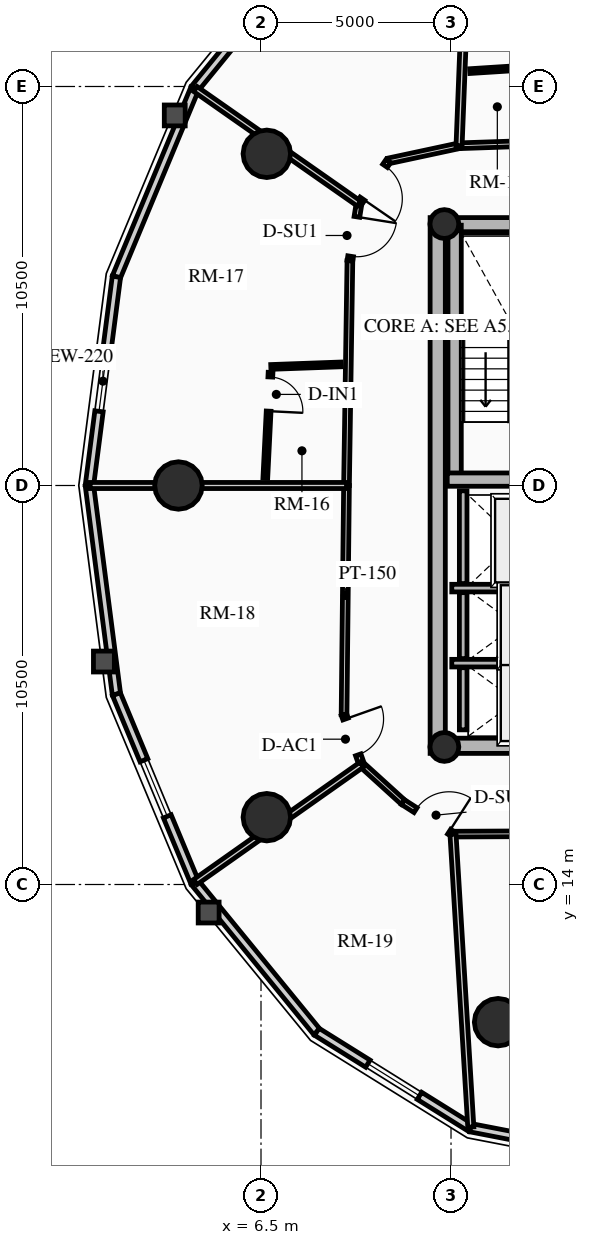
"""IFC4 building model, lengths in metres.
Left out: names, types, materials, properties, quantities, classifications, styles, units other than length and angle.
Written with IfcOpenShell. Run it as: python <this file> out.ifc"""

import sys

from ifc_helpers import new_model, si_unit, direction, frame, frame_2d, origin, origin_2d, place, context, subcontext, project, spatial, rectangle, circle, hollow_circle, extrude, source, transform, mapped, element, fill, save


model = new_model("IFC4")
c1 = context("Model", 3, precision=1e-05, world=origin(), true_north=direction((0.0, 1.0)))
c2 = subcontext(c1, "Body", "Model", "MODEL_VIEW")
j1 = project(units=[si_unit("LENGTHUNIT", "METRE"), si_unit("PLANEANGLEUNIT", "RADIAN")], contexts=[c1])
p1 = place(None, origin())
s1 = spatial("IfcSite", under=j1, at=p1, CompositionType="ELEMENT")
p2 = place(p1, origin())
s2 = spatial("IfcBuilding", under=s1, at=p2, CompositionType="ELEMENT")
p3 = place(p2, frame((0.0, 0.0, 157.42)))
s3 = spatial("IfcBuildingStorey", under=s2, at=p3, CompositionType="ELEMENT", Elevation=157.42)
p4 = place(p3, frame((11.15, 17.45, 0.0), z_axis=(0.0, 0.0, 1.0), x_axis=(0.0, 1.0, 0.0)))
e1 = element("IfcWall", 1, at=p4, inside=s3, PredefinedType="SHEAR", context=c2, shape_type="SweptSolid", body=[
    extrude(rectangle(XDim=14.1, YDim=0.4, at=frame_2d((7.05, 0.0))), origin(), (0.0, 0.0, 1.0), 2.91),
])
p5 = place(p3, frame((11.15, 17.65, 0.0), z_axis=(0.0, 0.0, 1.0), x_axis=(1.0, 0.0, 0.0)))
e2 = element("IfcWall", 2, at=p5, inside=s3, PredefinedType="SHEAR", context=c2, shape_type="SweptSolid", body=[
    extrude(rectangle(XDim=10.7, YDim=0.4, at=frame_2d((5.35, 0.0))), origin(), (0.0, 0.0, 1.0), 2.91),
])
m1 = source(origin(), c2, "Body", "SweptSolid", [
    extrude(rectangle(XDim=1.5, YDim=2.02, at=frame_2d((0.75, 1.01))), frame((0.0, 0.21, 0.0), z_axis=(0.0, -1.0, 0.0), x_axis=(1.0, 0.0, 0.0)), (0.0, 0.0, 1.0), 0.42),
])
p6 = place(p5, frame((5.45, 0.0, 0.0)))
e3 = element("IfcOpeningElement", 3, at=p6, cuts=e2, PredefinedType="OPENING", context=c2, shape_type="MappedRepresentation", body=[
    mapped(m1, transform((0.0, 0.0, 0.0), x_axis=(1.0, 0.0, 0.0), y_axis=(0.0, 1.0, 0.0), z_axis=(0.0, 0.0, 1.0), scale=1.0)),
])
p7 = place(p3, frame((11.15, 31.35, 0.0), z_axis=(0.0, 0.0, 1.0), x_axis=(1.0, 0.0, 0.0)))
e4 = element("IfcWall", 4, at=p7, inside=s3, PredefinedType="SHEAR", context=c2, shape_type="SweptSolid", body=[
    extrude(rectangle(XDim=10.7, YDim=0.4, at=frame_2d((5.35, 0.0))), origin(), (0.0, 0.0, 1.0), 2.91),
])
p8 = place(p7, frame((4.6, 0.0, 0.0)))
e5 = element("IfcOpeningElement", 5, at=p8, cuts=e4, PredefinedType="OPENING", context=c2, shape_type="MappedRepresentation", body=[
    mapped(m1, transform((0.0, 0.0, 0.0), x_axis=(1.0, 0.0, 0.0), y_axis=(0.0, 1.0, 0.0), z_axis=(0.0, 0.0, 1.0), scale=1.0)),
])
p9 = place(p3, frame((11.595, 24.655, 0.0), z_axis=(0.0, 0.0, 1.0), x_axis=(0.0, 1.0, 0.0)))
e6 = element("IfcWall", 6, at=p9, inside=s3, PredefinedType="SHEAR", context=c2, shape_type="SweptSolid", body=[
    extrude(rectangle(XDim=6.695, YDim=0.35, at=frame_2d((3.348, 0.0))), origin(), (0.0, 0.0, 1.0), 2.91),
])
p10 = place(p3, frame((11.4, 24.655, 0.0), z_axis=(0.0, 0.0, 1.0), x_axis=(1.0, 0.0, 0.0)))
e7 = element("IfcWall", 7, at=p10, inside=s3, PredefinedType="SHEAR", context=c2, shape_type="SweptSolid", body=[
    extrude(rectangle(XDim=3.285, YDim=0.35, at=frame_2d((1.643, 0.0))), origin(), (0.0, 0.0, 1.0), 2.91),
])
for number, where, z_axis, x_axis in (
    (8, (11.325, 17.62, 0.0), (0.0, 0.0, 1.0), (1.0, 0.0, 0.0)),
    (9, (11.325, 31.38, 0.0), (0.0, 0.0, 1.0), (1.0, 0.0, 0.0)),
):
    element("IfcColumn", number, at=place(p3, frame(where, z_axis=z_axis, x_axis=x_axis)), inside=s3, PredefinedType="COLUMN", context=c2, shape_type="SweptSolid", body=[
        extrude(hollow_circle(Radius=0.38, WallThickness=0.032, at=origin_2d()), origin(), (0.0, 0.0, 1.0), 2.91),
    ])
for number, where, z_axis, x_axis in (
    (10, (6.653, 33.229, 0.0), (0.0, 0.0, 1.0), (1.0, 0.0, 0.0)),
    (11, (4.328, 24.5, 0.0), (0.0, 0.0, 1.0), (1.0, 0.0, 0.0)),
    (12, (6.653, 15.771, 0.0), (0.0, 0.0, 1.0), (1.0, 0.0, 0.0)),
    (13, (12.739, 10.377, 0.0), (0.0, 0.0, 1.0), (1.0, 0.0, 0.0)),
):
    element("IfcColumn", number, at=place(p3, frame(where, z_axis=z_axis, x_axis=x_axis)), inside=s3, PredefinedType="USERDEFINED", context=c2, shape_type="SweptSolid", body=[
        extrude(circle(Radius=0.625, at=origin_2d()), origin(), (0.0, 0.0, 1.0), 2.91),
    ])
p11 = place(p3, frame((4.757, 34.945, 0.0), z_axis=(0.0, 0.0, 1.0), x_axis=(0.632598524901, 0.774479894053, 0.0)))
e14 = element("IfcWall", 14, at=p11, inside=s3, PredefinedType="SOLIDWALL", context=c2, shape_type="SweptSolid", body=[
    extrude(rectangle(XDim=5.076, YDim=0.22, at=frame_2d((2.538, 0.0))), origin(), (0.0, 0.0, 1.0), 2.245),
])
m2 = source(origin(), c2, "Body", "SweptSolid", [
    extrude(rectangle(XDim=1.6, YDim=1.3, at=frame_2d((0.8, 0.65))), frame((0.0, 0.12, 0.0), z_axis=(0.0, -1.0, 0.0), x_axis=(1.0, 0.0, 0.0)), (0.0, 0.0, 1.0), 0.24),
])
p12 = place(p11, frame((1.738, 0.0, 0.65)))
e15 = element("IfcOpeningElement", 15, at=p12, cuts=e14, PredefinedType="OPENING", context=c2, shape_type="MappedRepresentation", body=[
    mapped(m2, transform((0.0, 0.0, 0.0), x_axis=(1.0, 0.0, 0.0), y_axis=(0.0, 1.0, 0.0), z_axis=(0.0, 0.0, 1.0), scale=1.0)),
])
p13 = place(p3, frame((2.695, 29.991, 0.0), z_axis=(0.0, 0.0, 1.0), x_axis=(0.384259959969, 0.923224936386, 0.0)))
e16 = element("IfcWall", 16, at=p13, inside=s3, PredefinedType="SOLIDWALL", context=c2, shape_type="SweptSolid", body=[
    extrude(rectangle(XDim=5.365, YDim=0.22, at=frame_2d((2.683, 0.0))), origin(), (0.0, 0.0, 1.0), 2.245),
])
p14 = place(p3, frame((1.985, 24.5, 0.0), z_axis=(0.0, 0.0, 1.0), x_axis=(0.128266533912, 0.991739732126, 0.0)))
e17 = element("IfcWall", 17, at=p14, inside=s3, PredefinedType="SOLIDWALL", context=c2, shape_type="SweptSolid", body=[
    extrude(rectangle(XDim=5.537, YDim=0.22, at=frame_2d((2.769, 0.0))), origin(), (0.0, 0.0, 1.0), 2.245),
])
p15 = place(p14, frame((1.968, 0.0, 0.65)))
e18 = element("IfcOpeningElement", 18, at=p15, cuts=e17, PredefinedType="OPENING", context=c2, shape_type="MappedRepresentation", body=[
    mapped(m2, transform((0.0, 0.0, 0.0), x_axis=(1.0, 0.0, 0.0), y_axis=(0.0, 1.0, 0.0), z_axis=(0.0, 0.0, 1.0), scale=1.0)),
])
p16 = place(p3, frame((2.695, 19.009, 0.0), z_axis=(0.0, 0.0, 1.0), x_axis=(-0.128266533912, 0.991739732126, 0.0)))
e19 = element("IfcWall", 19, at=p16, inside=s3, PredefinedType="SOLIDWALL", context=c2, shape_type="SweptSolid", body=[
    extrude(rectangle(XDim=5.537, YDim=0.22, at=frame_2d((2.769, 0.0))), origin(), (0.0, 0.0, 1.0), 2.245),
])
p17 = place(p3, frame((4.757, 14.055, 0.0), z_axis=(0.0, 0.0, 1.0), x_axis=(-0.384259959969, 0.923224936386, 0.0)))
e20 = element("IfcWall", 20, at=p17, inside=s3, PredefinedType="SOLIDWALL", context=c2, shape_type="SweptSolid", body=[
    extrude(rectangle(XDim=5.365, YDim=0.22, at=frame_2d((2.683, 0.0))), origin(), (0.0, 0.0, 1.0), 2.245),
])
p18 = place(p17, frame((1.883, 0.0, 0.65)))
e21 = element("IfcOpeningElement", 21, at=p18, cuts=e20, PredefinedType="OPENING", context=c2, shape_type="MappedRepresentation", body=[
    mapped(m2, transform((0.0, 0.0, 0.0), x_axis=(1.0, 0.0, 0.0), y_axis=(0.0, 1.0, 0.0), z_axis=(0.0, 0.0, 1.0), scale=1.0)),
])
p19 = place(p3, frame((7.968, 10.124, 0.0), z_axis=(0.0, 0.0, 1.0), x_axis=(-0.632598524901, 0.774479894053, 0.0)))
e22 = element("IfcWall", 22, at=p19, inside=s3, PredefinedType="SOLIDWALL", context=c2, shape_type="SweptSolid", body=[
    extrude(rectangle(XDim=5.076, YDim=0.22, at=frame_2d((2.538, 0.0))), origin(), (0.0, 0.0, 1.0), 2.245),
])
p20 = place(p3, frame((12.015, 7.6, 0.0), z_axis=(0.0, 0.0, 1.0), x_axis=(-0.848452391194, 0.529271707044, 0.0)))
e23 = element("IfcWall", 23, at=p20, inside=s3, PredefinedType="SOLIDWALL", context=c2, shape_type="SweptSolid", body=[
    extrude(rectangle(XDim=4.769, YDim=0.22, at=frame_2d((2.385, 0.0))), origin(), (0.0, 0.0, 1.0), 2.245),
])
p21 = place(p20, frame((1.585, 0.0, 0.65)))
e24 = element("IfcOpeningElement", 24, at=p21, cuts=e23, PredefinedType="OPENING", context=c2, shape_type="MappedRepresentation", body=[
    mapped(m2, transform((0.0, 0.0, 0.0), x_axis=(1.0, 0.0, 0.0), y_axis=(0.0, 1.0, 0.0), z_axis=(0.0, 0.0, 1.0), scale=1.0)),
])
p22 = place(p3, frame((16.5, 6.73, 0.0), z_axis=(0.0, 0.0, 1.0), x_axis=(-0.981718699963, 0.190337579429, 0.0)))
e25 = element("IfcWall", 25, at=p22, inside=s3, PredefinedType="SOLIDWALL", context=c2, shape_type="SweptSolid", body=[
    extrude(rectangle(XDim=4.569, YDim=0.22, at=frame_2d((2.284, 0.0))), origin(), (0.0, 0.0, 1.0), 2.245),
])
p23 = place(p22, frame((1.484, 0.0, 0.65)))
e26 = element("IfcOpeningElement", 26, at=p23, cuts=e25, PredefinedType="OPENING", context=c2, shape_type="MappedRepresentation", body=[
    mapped(m2, transform((0.0, 0.0, 0.0), x_axis=(1.0, 0.0, 0.0), y_axis=(0.0, 1.0, 0.0), z_axis=(0.0, 0.0, 1.0), scale=1.0)),
])
p24 = place(p3, frame((11.52, 21.8, 0.0), z_axis=(0.0, 0.0, 1.0), x_axis=(1.0, 0.0, 0.0)))
e27 = element("IfcWall", 27, at=p24, inside=s3, PredefinedType="SHEAR", context=c2, shape_type="SweptSolid", body=[
    extrude(rectangle(XDim=2.97, YDim=0.2, at=frame_2d((1.485, 0.0))), origin(), (0.0, 0.0, 1.0), 2.91),
])
p25 = place(p3, frame((11.82, 21.92, 0.0), z_axis=(0.0, 0.0, 1.0), x_axis=(0.0, 1.0, 0.0)))
e28 = element("IfcWall", 28, at=p25, inside=s3, PredefinedType="SHEAR", context=c2, shape_type="SweptSolid", body=[
    extrude(rectangle(XDim=2.44, YDim=0.2, at=frame_2d((1.22, 0.0))), origin(), (0.0, 0.0, 1.0), 2.91),
])
p26 = place(p3, frame((11.52, 19.825, 0.0), z_axis=(0.0, 0.0, 1.0), x_axis=(1.0, 0.0, 0.0)))
e29 = element("IfcWall", 29, at=p26, inside=s3, PredefinedType="SHEAR", context=c2, shape_type="SweptSolid", body=[
    extrude(rectangle(XDim=2.97, YDim=0.2, at=frame_2d((1.485, 0.0))), origin(), (0.0, 0.0, 1.0), 2.91),
])
p27 = place(p3, frame((11.82, 19.945, 0.0), z_axis=(0.0, 0.0, 1.0), x_axis=(0.0, 1.0, 0.0)))
e30 = element("IfcWall", 30, at=p27, inside=s3, PredefinedType="SHEAR", context=c2, shape_type="SweptSolid", body=[
    extrude(rectangle(XDim=1.735, YDim=0.2, at=frame_2d((0.867, 0.0))), origin(), (0.0, 0.0, 1.0), 2.91),
])
p28 = place(p3, frame((11.82, 18.07, 0.0), z_axis=(0.0, 0.0, 1.0), x_axis=(0.0, 1.0, 0.0)))
e31 = element("IfcWall", 31, at=p28, inside=s3, PredefinedType="SHEAR", context=c2, shape_type="SweptSolid", body=[
    extrude(rectangle(XDim=1.635, YDim=0.2, at=frame_2d((0.817, 0.0))), origin(), (0.0, 0.0, 1.0), 2.91),
])
p29 = place(p3, frame((18.112, 33.659, 0.0), z_axis=(0.0, 0.0, 1.0), x_axis=(-0.999413895918, -0.034232508622, 0.0)))
e32 = element("IfcWall", 32, at=p29, inside=s3, PredefinedType="PARTITIONING", context=c2, shape_type="SweptSolid", body=[
    extrude(rectangle(XDim=6.404, YDim=0.15, at=frame_2d((3.202, 0.0))), origin(), (0.0, 0.0, 1.0), 2.245),
])
p30 = place(p3, frame((11.712, 33.44, 0.0), z_axis=(0.0, 0.0, 1.0), x_axis=(-0.977753514213, -0.209757158265, 0.0)))
e33 = element("IfcWall", 33, at=p30, inside=s3, PredefinedType="PARTITIONING", context=c2, shape_type="SweptSolid", body=[
    extrude(rectangle(XDim=1.901, YDim=0.15, at=frame_2d((0.95, 0.0))), origin(), (0.0, 0.0, 1.0), 2.245),
])
p31 = place(p3, frame((9.853, 33.042, 0.0), z_axis=(0.0, 0.0, 1.0), x_axis=(-0.567189283521, -0.823587467522, 0.0)))
e34 = element("IfcWall", 34, at=p31, inside=s3, PredefinedType="PARTITIONING", context=c2, shape_type="SweptSolid", body=[
    extrude(rectangle(XDim=1.365, YDim=0.15, at=frame_2d((0.682, 0.0))), origin(), (0.0, 0.0, 1.0), 2.245),
])
m3 = source(origin(), c2, "Body", "SweptSolid", [
    extrude(rectangle(XDim=1.05, YDim=2.015, at=frame_2d((0.525, 1.007))), frame((0.0, 0.085, 0.0), z_axis=(0.0, -1.0, 0.0), x_axis=(1.0, 0.0, 0.0)), (0.0, 0.0, 1.0), 0.17),
])
p32 = place(p31, frame((0.157, 0.0, 0.0)))
e35 = element("IfcOpeningElement", 35, at=p32, cuts=e34, PredefinedType="OPENING", context=c2, shape_type="MappedRepresentation", body=[
    mapped(m3, transform((0.0, 0.0, 0.0), x_axis=(1.0, 0.0, 0.0), y_axis=(0.0, 1.0, 0.0), z_axis=(0.0, 0.0, 1.0), scale=1.0)),
])
p33 = place(p3, frame((9.079, 31.918, 0.0), z_axis=(0.0, 0.0, 1.0), x_axis=(-0.15742775293, -0.987530507178, 0.0)))
e36 = element("IfcWall", 36, at=p33, inside=s3, PredefinedType="PARTITIONING", context=c2, shape_type="SweptSolid", body=[
    extrude(rectangle(XDim=1.523, YDim=0.15, at=frame_2d((0.761, 0.0))), origin(), (0.0, 0.0, 1.0), 2.245),
])
p34 = place(p33, frame((0.353, 0.0, 0.0)))
e37 = element("IfcOpeningElement", 37, at=p34, cuts=e36, PredefinedType="OPENING", context=c2, shape_type="MappedRepresentation", body=[
    mapped(m3, transform((0.0, 0.0, 0.0), x_axis=(1.0, 0.0, 0.0), y_axis=(0.0, 1.0, 0.0), z_axis=(0.0, 0.0, 1.0), scale=1.0)),
])
p35 = place(p3, frame((8.84, 30.414, 0.0), z_axis=(0.0, 0.0, 1.0), x_axis=(-0.01514915101, -0.999885245027, 0.0)))
e38 = element("IfcWall", 38, at=p35, inside=s3, PredefinedType="PARTITIONING", context=c2, shape_type="SweptSolid", body=[
    extrude(rectangle(XDim=5.915, YDim=0.15, at=frame_2d((2.957, 0.0))), origin(), (0.0, 0.0, 1.0), 2.675),
])
p36 = place(p3, frame((8.75, 24.5, 0.0), z_axis=(0.0, 0.0, 1.0), x_axis=(-0.01076642715, -0.999942040344, 0.0)))
e39 = element("IfcWall", 39, at=p36, inside=s3, PredefinedType="PARTITIONING", context=c2, shape_type="SweptSolid", body=[
    extrude(rectangle(XDim=6.032, YDim=0.15, at=frame_2d((3.016, 0.0))), origin(), (0.0, 0.0, 1.0), 2.245),
])
p37 = place(p3, frame((8.685, 18.469, 0.0), z_axis=(0.0, 0.0, 1.0), x_axis=(0.333415749461, -0.942779899028, 0.0)))
e40 = element("IfcWall", 40, at=p37, inside=s3, PredefinedType="PARTITIONING", context=c2, shape_type="SweptSolid", body=[
    extrude(rectangle(XDim=1.394, YDim=0.15, at=frame_2d((0.697, 0.0))), origin(), (0.0, 0.0, 1.0), 2.245),
])
m4 = source(origin(), c2, "Body", "SweptSolid", [
    extrude(rectangle(XDim=1.0, YDim=2.015, at=frame_2d((0.5, 1.007))), frame((0.0, 0.085, 0.0), z_axis=(0.0, -1.0, 0.0), x_axis=(1.0, 0.0, 0.0)), (0.0, 0.0, 1.0), 0.17),
])
p38 = place(p37, frame((0.12, 0.0, 0.0)))
e41 = element("IfcOpeningElement", 41, at=p38, cuts=e40, PredefinedType="OPENING", context=c2, shape_type="MappedRepresentation", body=[
    mapped(m4, transform((0.0, 0.0, 0.0), x_axis=(1.0, 0.0, 0.0), y_axis=(0.0, 1.0, 0.0), z_axis=(0.0, 0.0, 1.0), scale=1.0)),
])
p39 = place(p3, frame((9.15, 17.155, 0.0), z_axis=(0.0, 0.0, 1.0), x_axis=(0.740451494731, -0.672109800517, 0.0)))
e42 = element("IfcWall", 42, at=p39, inside=s3, PredefinedType="PARTITIONING", context=c2, shape_type="SweptSolid", body=[
    extrude(rectangle(XDim=1.468, YDim=0.15, at=frame_2d((0.734, 0.0))), origin(), (0.0, 0.0, 1.0), 2.245),
])
p40 = place(p3, frame((10.237, 16.168, 0.0), z_axis=(0.0, 0.0, 1.0), x_axis=(0.842061223587, -0.53938195718, 0.0)))
e43 = element("IfcWall", 43, at=p40, inside=s3, PredefinedType="PARTITIONING", context=c2, shape_type="SweptSolid", body=[
    extrude(rectangle(XDim=1.562, YDim=0.15, at=frame_2d((0.781, 0.0))), origin(), (0.0, 0.0, 1.0), 2.245),
])
p41 = place(p40, frame((0.392, 0.0, 0.0)))
e44 = element("IfcOpeningElement", 44, at=p41, cuts=e43, PredefinedType="OPENING", context=c2, shape_type="MappedRepresentation", body=[
    mapped(m3, transform((0.0, 0.0, 0.0), x_axis=(1.0, 0.0, 0.0), y_axis=(0.0, 1.0, 0.0), z_axis=(0.0, 0.0, 1.0), scale=1.0)),
])
p42 = place(p3, frame((11.552, 15.326, 0.0), z_axis=(0.0, 0.0, 1.0), x_axis=(0.999989573465, 0.004566504266, 0.0)))
e45 = element("IfcWall", 45, at=p42, inside=s3, PredefinedType="PARTITIONING", context=c2, shape_type="SweptSolid", body=[
    extrude(rectangle(XDim=3.261, YDim=0.15, at=frame_2d((1.631, 0.0))), origin(), (0.0, 0.0, 1.0), 2.245),
])
p43 = place(p3, frame((11.712, 33.44, 0.0), z_axis=(0.0, 0.0, 1.0), x_axis=(0.038892064024, 0.999243417469, 0.0)))
e46 = element("IfcWall", 46, at=p43, inside=s3, PredefinedType="PARTITIONING", context=c2, shape_type="SweptSolid", body=[
    extrude(rectangle(XDim=7.947, YDim=0.16, at=frame_2d((3.974, 0.0))), origin(), (0.0, 0.0, 1.0), 2.245),
])
p44 = place(p3, frame((9.079, 31.918, 0.0), z_axis=(0.0, 0.0, 1.0), x_axis=(-0.819135909075, 0.573599479135, 0.0)))
e47 = element("IfcWall", 47, at=p44, inside=s3, PredefinedType="PARTITIONING", context=c2, shape_type="SweptSolid", body=[
    extrude(rectangle(XDim=5.257, YDim=0.16, at=frame_2d((2.628, 0.0))), origin(), (0.0, 0.0, 1.0), 2.245),
])
p45 = place(p3, frame((8.75, 24.5, 0.0), z_axis=(0.0, 0.0, 1.0), x_axis=(-1.0, 0.0, 0.0)))
e48 = element("IfcWall", 48, at=p45, inside=s3, PredefinedType="PARTITIONING", context=c2, shape_type="SweptSolid", body=[
    extrude(rectangle(XDim=6.745, YDim=0.16, at=frame_2d((3.373, 0.0))), origin(), (0.0, 0.0, 1.0), 2.245),
])
p46 = place(p3, frame((9.15, 17.155, 0.0), z_axis=(0.0, 0.0, 1.0), x_axis=(-0.81708911443, -0.576511386774, 0.0)))
e49 = element("IfcWall", 49, at=p46, inside=s3, PredefinedType="PARTITIONING", context=c2, shape_type="SweptSolid", body=[
    extrude(rectangle(XDim=5.356, YDim=0.16, at=frame_2d((2.678, 0.0))), origin(), (0.0, 0.0, 1.0), 2.245),
])
p47 = place(p3, frame((11.552, 15.326, 0.0), z_axis=(0.0, 0.0, 1.0), x_axis=(0.060740403573, -0.998153597085, 0.0)))
e50 = element("IfcWall", 50, at=p47, inside=s3, PredefinedType="PARTITIONING", context=c2, shape_type="SweptSolid", body=[
    extrude(rectangle(XDim=7.721, YDim=0.16, at=frame_2d((3.861, 0.0))), origin(), (0.0, 0.0, 1.0), 2.245),
])
p48 = place(p3, frame((14.841, 35.586, 0.0), z_axis=(0.0, 0.0, 1.0), x_axis=(-0.997963636416, -0.063785424599, 0.0)))
e51 = element("IfcWall", 51, at=p48, inside=s3, PredefinedType="PARTITIONING", context=c2, shape_type="SweptSolid", body=[
    extrude(rectangle(XDim=2.852, YDim=0.125, at=frame_2d((1.426, 0.0))), origin(), (0.0, 0.0, 1.0), 2.245),
])
m5 = source(origin(), c2, "Body", "SweptSolid", [
    extrude(rectangle(XDim=0.9, YDim=2.005, at=frame_2d((0.45, 1.002))), frame((0.0, 0.073, 0.0), z_axis=(0.0, -1.0, 0.0), x_axis=(1.0, 0.0, 0.0)), (0.0, 0.0, 1.0), 0.145),
])
p49 = place(p48, frame((0.12, 0.0, 0.0)))
e52 = element("IfcOpeningElement", 52, at=p49, cuts=e51, PredefinedType="OPENING", context=c2, shape_type="MappedRepresentation", body=[
    mapped(m5, transform((0.0, 0.0, 0.0), x_axis=(1.0, 0.0, 0.0), y_axis=(0.0, 1.0, 0.0), z_axis=(0.0, 0.0, 1.0), scale=1.0)),
])
p50 = place(p3, frame((8.606, 27.687, 0.0), z_axis=(0.0, 0.0, 1.0), x_axis=(-0.999349834195, -0.036054249337, 0.0)))
e53 = element("IfcWall", 53, at=p50, inside=s3, PredefinedType="PARTITIONING", context=c2, shape_type="SweptSolid", body=[
    extrude(rectangle(XDim=1.849, YDim=0.125, at=frame_2d((0.924, 0.0))), origin(), (0.0, 0.0, 1.0), 2.675),
])
p51 = place(p3, frame((6.751, 27.475, 0.0), z_axis=(0.0, 0.0, 1.0), x_axis=(-0.049591166042, -0.998769601185, 0.0)))
e54 = element("IfcWall", 54, at=p51, inside=s3, PredefinedType="PARTITIONING", context=c2, shape_type="SweptSolid", body=[
    extrude(rectangle(XDim=2.777, YDim=0.125, at=frame_2d((1.388, 0.0))), origin(), (0.0, 0.0, 1.0), 2.675),
])
p52 = place(p51, frame((0.12, 0.0, 0.0)))
e55 = element("IfcOpeningElement", 55, at=p52, cuts=e54, PredefinedType="OPENING", context=c2, shape_type="MappedRepresentation", body=[
    mapped(m5, transform((0.0, 0.0, 0.0), x_axis=(1.0, 0.0, 0.0), y_axis=(0.0, 1.0, 0.0), z_axis=(0.0, 0.0, 1.0), scale=1.0)),
])
m6 = source(origin(), c2, "Body", "SweptSolid", [
    extrude(rectangle(XDim=1.6, YDim=1.3, at=frame_2d((0.8, 0.65))), frame((0.0, 0.03, 0.0), z_axis=(0.0, -1.0, 0.0), x_axis=(1.0, 0.0, 0.0)), (0.0, 0.0, 1.0), 0.06),
])
p53 = place(p15, origin())
e56 = element("IfcWindow", 56, at=p53, inside=s3, PartitioningType="SINGLE_PANEL", PredefinedType="WINDOW", context=c2, shape_type="MappedRepresentation", body=[
    mapped(m6, transform((0.0, 0.0, 0.0), x_axis=(1.0, 0.0, 0.0), y_axis=(0.0, 1.0, 0.0), z_axis=(0.0, 0.0, 1.0), scale=1.0)),
])
fill(e18, e56)
p54 = place(p18, origin())
e57 = element("IfcWindow", 57, at=p54, inside=s3, PartitioningType="SINGLE_PANEL", PredefinedType="WINDOW", context=c2, shape_type="MappedRepresentation", body=[
    mapped(m6, transform((0.0, 0.0, 0.0), x_axis=(1.0, 0.0, 0.0), y_axis=(0.0, 1.0, 0.0), z_axis=(0.0, 0.0, 1.0), scale=1.0)),
])
fill(e21, e57)
p55 = place(p21, origin())
e58 = element("IfcWindow", 58, at=p55, inside=s3, PartitioningType="SINGLE_PANEL", PredefinedType="WINDOW", context=c2, shape_type="MappedRepresentation", body=[
    mapped(m6, transform((0.0, 0.0, 0.0), x_axis=(1.0, 0.0, 0.0), y_axis=(0.0, 1.0, 0.0), z_axis=(0.0, 0.0, 1.0), scale=1.0)),
])
fill(e24, e58)
m7 = source(origin(), c2, "Body", "SweptSolid", [
    extrude(rectangle(XDim=1.05, YDim=2.015, at=frame_2d((0.525, 1.007))), frame((0.0, 0.025, 0.0), z_axis=(0.0, -1.0, 0.0), x_axis=(1.0, 0.0, 0.0)), (0.0, 0.0, 1.0), 0.05),
])
p56 = place(p32, origin())
e59 = element("IfcDoor", 59, at=p56, inside=s3, OperationType="SINGLE_SWING_RIGHT", PredefinedType="DOOR", context=c2, shape_type="MappedRepresentation", body=[
    mapped(m7, transform((0.0, 0.0, 0.0), x_axis=(1.0, 0.0, 0.0), y_axis=(0.0, 1.0, 0.0), z_axis=(0.0, 0.0, 1.0), scale=1.0)),
])
fill(e35, e59)
p57 = place(p34, origin())
e60 = element("IfcDoor", 60, at=p57, inside=s3, OperationType="SINGLE_SWING_LEFT", PredefinedType="DOOR", context=c2, shape_type="MappedRepresentation", body=[
    mapped(m7, transform((0.0, 0.0, 0.0), x_axis=(1.0, 0.0, 0.0), y_axis=(0.0, 1.0, 0.0), z_axis=(0.0, 0.0, 1.0), scale=1.0)),
])
fill(e37, e60)
m8 = source(origin(), c2, "Body", "SweptSolid", [
    extrude(rectangle(XDim=0.9, YDim=2.005, at=frame_2d((0.45, 1.002))), frame((0.0, 0.025, 0.0), z_axis=(0.0, -1.0, 0.0), x_axis=(1.0, 0.0, 0.0)), (0.0, 0.0, 1.0), 0.05),
])
p58 = place(p52, origin())
e61 = element("IfcDoor", 61, at=p58, inside=s3, OperationType="SINGLE_SWING_RIGHT", PredefinedType="DOOR", context=c2, shape_type="MappedRepresentation", body=[
    mapped(m8, transform((0.0, 0.0, 0.0), x_axis=(1.0, 0.0, 0.0), y_axis=(0.0, 1.0, 0.0), z_axis=(0.0, 0.0, 1.0), scale=1.0)),
])
fill(e55, e61)
m9 = source(origin(), c2, "Body", "SweptSolid", [
    extrude(rectangle(XDim=1.0, YDim=2.015, at=frame_2d((0.5, 1.007))), frame((0.0, 0.025, 0.0), z_axis=(0.0, -1.0, 0.0), x_axis=(1.0, 0.0, 0.0)), (0.0, 0.0, 1.0), 0.05),
])
p59 = place(p38, origin())
e62 = element("IfcDoor", 62, at=p59, inside=s3, OperationType="SINGLE_SWING_LEFT", PredefinedType="DOOR", context=c2, shape_type="MappedRepresentation", body=[
    mapped(m9, transform((0.0, 0.0, 0.0), x_axis=(1.0, 0.0, 0.0), y_axis=(0.0, 1.0, 0.0), z_axis=(0.0, 0.0, 1.0), scale=1.0)),
])
fill(e41, e62)
p60 = place(p41, origin())
e63 = element("IfcDoor", 63, at=p60, inside=s3, OperationType="SINGLE_SWING_RIGHT", PredefinedType="DOOR", context=c2, shape_type="MappedRepresentation", body=[
    mapped(m7, transform((0.0, 0.0, 0.0), x_axis=(1.0, 0.0, 0.0), y_axis=(0.0, 1.0, 0.0), z_axis=(0.0, 0.0, 1.0), scale=1.0)),
])
fill(e44, e63)
save(model, sys.argv[1])
